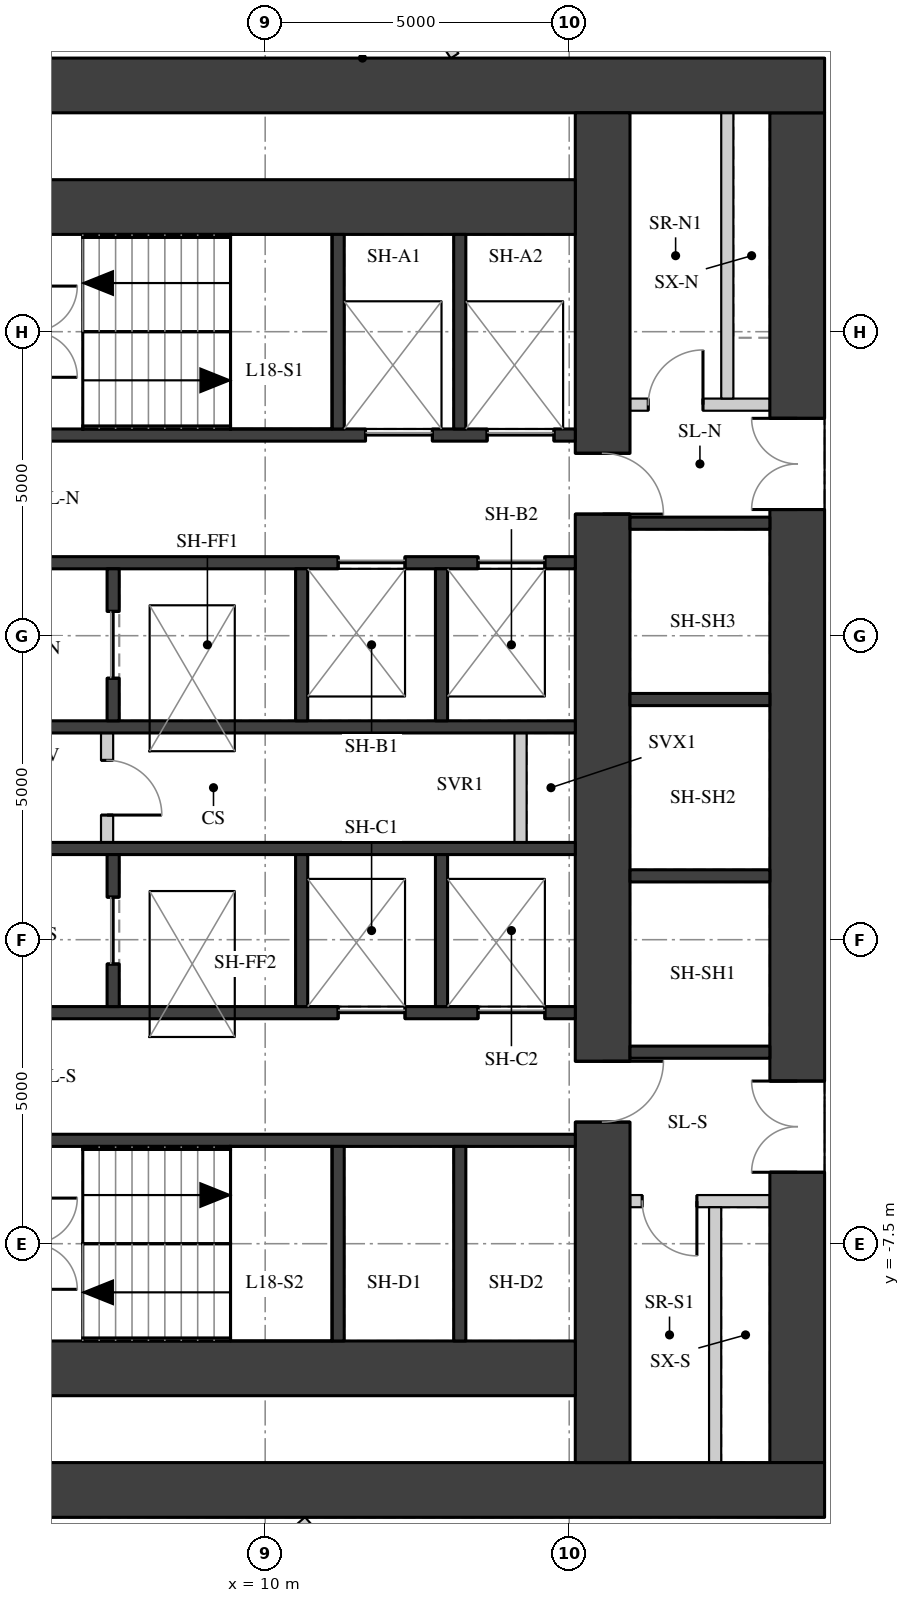
"""IFC4 building model, lengths in metres.
Left out: names, types, materials, properties, quantities, classifications, styles, units other than length and angle.
Written with IfcOpenShell. Run it as: python <this file> out.ifc"""

import sys

from ifc_helpers import new_model, si_unit, direction, frame, frame_2d, origin, place, context, subcontext, project, spatial, rectangle, extrude, element, fill, save


model = new_model("IFC4")
c1 = context("Model", 3, precision=1e-05, world=origin(), true_north=direction((0.0, 1.0)))
c2 = subcontext(c1, "Body", "Model", "MODEL_VIEW")
j1 = project(units=[si_unit("LENGTHUNIT", "METRE"), si_unit("PLANEANGLEUNIT", "RADIAN")], contexts=[c1])
p1 = place(None, origin())
s1 = spatial("IfcSite", under=j1, at=p1, CompositionType="ELEMENT")
p2 = place(p1, origin())
s2 = spatial("IfcBuilding", under=s1, at=p2, CompositionType="ELEMENT")
p3 = place(p2, frame((0.0, 0.0, 67.9)))
s3 = spatial("IfcBuildingStorey", under=s2, at=p3, CompositionType="ELEMENT", Elevation=67.9)
p4 = place(p3, frame((18.75, -11.1, 0.0), z_axis=(0.0, 0.0, 1.0), x_axis=(0.0, 1.0, 0.0)))
e1 = element("IfcWall", 1, at=p4, inside=s3, PredefinedType="SHEAR", context=c2, shape_type="SweptSolid", body=[
    extrude(rectangle(XDim=22.2, YDim=0.9, at=frame_2d((11.1, 0.0))), origin(), (0.0, 0.0, 1.0), 3.02),
])
p5 = place(p4, frame((15.675, 0.0, 0.0)))
e2 = element("IfcOpeningElement", 2, at=p5, cuts=e1, PredefinedType="OPENING", context=c2, shape_type="SweptSolid", body=[
    extrude(rectangle(XDim=1.5, YDim=2.1, at=frame_2d((0.75, 1.05))), frame((0.0, 0.46, 0.0), z_axis=(0.0, -1.0, 0.0), x_axis=(1.0, 0.0, 0.0)), (0.0, 0.0, 1.0), 0.92),
])
p6 = place(p4, frame((4.775, 0.0, 0.0)))
e3 = element("IfcOpeningElement", 3, at=p6, cuts=e1, PredefinedType="OPENING", context=c2, shape_type="SweptSolid", body=[
    extrude(rectangle(XDim=1.5, YDim=2.1, at=frame_2d((0.75, 1.05))), frame((0.0, 0.46, 0.0), z_axis=(0.0, -1.0, 0.0), x_axis=(1.0, 0.0, 0.0)), (0.0, 0.0, 1.0), 0.92),
])
for number, where, z_axis, x_axis in (
    (4, (4.0, 11.55, 0.0), (0.0, 0.0, 1.0), (1.0, 0.0, 0.0)),
    (5, (4.0, -11.55, 0.0), (0.0, 0.0, 1.0), (1.0, 0.0, 0.0)),
):
    element("IfcWall", number, at=place(p3, frame(where, z_axis=z_axis, x_axis=x_axis)), inside=s3, PredefinedType="SHEAR", context=c2, shape_type="SweptSolid", body=[
        extrude(rectangle(XDim=15.2, YDim=0.9, at=frame_2d((7.6, 0.0))), origin(), (0.0, 0.0, 1.0), 3.02),
    ])
p7 = place(p3, frame((15.55, -11.1, 0.0), z_axis=(0.0, 0.0, 1.0), x_axis=(0.0, 1.0, 0.0)))
e6 = element("IfcWall", 6, at=p7, inside=s3, PredefinedType="SHEAR", context=c2, shape_type="SweptSolid", body=[
    extrude(rectangle(XDim=22.2, YDim=0.9, at=frame_2d((11.1, 0.0))), origin(), (0.0, 0.0, 1.0), 3.02),
])
p8 = place(p7, frame((15.6, 0.0, 0.0)))
e7 = element("IfcOpeningElement", 7, at=p8, cuts=e6, PredefinedType="OPENING", context=c2, shape_type="SweptSolid", body=[
    extrude(rectangle(XDim=1.0, YDim=2.1, at=frame_2d((0.5, 1.05))), frame((0.0, 0.46, 0.0), z_axis=(0.0, -1.0, 0.0), x_axis=(1.0, 0.0, 0.0)), (0.0, 0.0, 1.0), 0.92),
])
p9 = place(p7, frame((5.6, 0.0, 0.0)))
e8 = element("IfcOpeningElement", 8, at=p9, cuts=e6, PredefinedType="OPENING", context=c2, shape_type="SweptSolid", body=[
    extrude(rectangle(XDim=1.0, YDim=2.1, at=frame_2d((0.5, 1.05))), frame((0.0, 0.46, 0.0), z_axis=(0.0, -1.0, 0.0), x_axis=(1.0, 0.0, 0.0)), (0.0, 0.0, 1.0), 0.92),
])
for number, where, z_axis, x_axis in (
    (9, (4.9, 9.55, 0.0), (0.0, 0.0, 1.0), (1.0, 0.0, 0.0)),
    (10, (4.9, -9.55, 0.0), (0.0, 0.0, 1.0), (1.0, 0.0, 0.0)),
):
    element("IfcWall", number, at=place(p3, frame(where, z_axis=z_axis, x_axis=x_axis)), inside=s3, PredefinedType="SHEAR", context=c2, shape_type="SweptSolid", body=[
        extrude(rectangle(XDim=10.2, YDim=0.9, at=frame_2d((5.1, 0.0))), origin(), (0.0, 0.0, 1.0), 3.02),
    ])
p10 = place(p3, frame((4.9, 5.8, 0.0), z_axis=(0.0, 0.0, 1.0), x_axis=(1.0, 0.0, 0.0)))
e11 = element("IfcWall", 11, at=p10, inside=s3, PredefinedType="SHEAR", context=c2, shape_type="SweptSolid", body=[
    extrude(rectangle(XDim=10.2, YDim=0.2, at=frame_2d((5.1, 0.0))), origin(), (0.0, 0.0, 1.0), 3.02),
])
p11 = place(p10, frame((6.75, 0.0, 0.0)))
e12 = element("IfcOpeningElement", 12, at=p11, cuts=e11, PredefinedType="OPENING", context=c2, shape_type="SweptSolid", body=[
    extrude(rectangle(XDim=1.1, YDim=2.1, at=frame_2d((0.55, 1.05))), frame((0.0, 0.11, 0.0), z_axis=(0.0, -1.0, 0.0), x_axis=(1.0, 0.0, 0.0)), (0.0, 0.0, 1.0), 0.22),
])
p12 = place(p10, frame((8.75, 0.0, 0.0)))
e13 = element("IfcOpeningElement", 13, at=p12, cuts=e11, PredefinedType="OPENING", context=c2, shape_type="SweptSolid", body=[
    extrude(rectangle(XDim=1.1, YDim=2.1, at=frame_2d((0.55, 1.05))), frame((0.0, 0.11, 0.0), z_axis=(0.0, -1.0, 0.0), x_axis=(1.0, 0.0, 0.0)), (0.0, 0.0, 1.0), 0.22),
])
p13 = place(p3, frame((4.9, 3.7, 0.0), z_axis=(0.0, 0.0, 1.0), x_axis=(1.0, 0.0, 0.0)))
e14 = element("IfcWall", 14, at=p13, inside=s3, PredefinedType="SHEAR", context=c2, shape_type="SweptSolid", body=[
    extrude(rectangle(XDim=10.2, YDim=0.2, at=frame_2d((5.1, 0.0))), origin(), (0.0, 0.0, 1.0), 3.02),
])
p14 = place(p13, frame((6.3, 0.0, 0.0)))
e15 = element("IfcOpeningElement", 15, at=p14, cuts=e14, PredefinedType="OPENING", context=c2, shape_type="SweptSolid", body=[
    extrude(rectangle(XDim=1.1, YDim=2.1, at=frame_2d((0.55, 1.05))), frame((0.0, 0.11, 0.0), z_axis=(0.0, -1.0, 0.0), x_axis=(1.0, 0.0, 0.0)), (0.0, 0.0, 1.0), 0.22),
])
p15 = place(p13, frame((8.6, 0.0, 0.0)))
e16 = element("IfcOpeningElement", 16, at=p15, cuts=e14, PredefinedType="OPENING", context=c2, shape_type="SweptSolid", body=[
    extrude(rectangle(XDim=1.1, YDim=2.1, at=frame_2d((0.55, 1.05))), frame((0.0, 0.11, 0.0), z_axis=(0.0, -1.0, 0.0), x_axis=(1.0, 0.0, 0.0)), (0.0, 0.0, 1.0), 0.22),
])
for number, where, z_axis, x_axis in (
    (17, (4.9, 1.0, 0.0), (0.0, 0.0, 1.0), (1.0, 0.0, 0.0)),
    (18, (4.9, -1.0, 0.0), (0.0, 0.0, 1.0), (1.0, 0.0, 0.0)),
):
    element("IfcWall", number, at=place(p3, frame(where, z_axis=z_axis, x_axis=x_axis)), inside=s3, PredefinedType="SHEAR", context=c2, shape_type="SweptSolid", body=[
        extrude(rectangle(XDim=10.2, YDim=0.2, at=frame_2d((5.1, 0.0))), origin(), (0.0, 0.0, 1.0), 3.02),
    ])
p16 = place(p3, frame((4.9, -3.7, 0.0), z_axis=(0.0, 0.0, 1.0), x_axis=(1.0, 0.0, 0.0)))
e19 = element("IfcWall", 19, at=p16, inside=s3, PredefinedType="SHEAR", context=c2, shape_type="SweptSolid", body=[
    extrude(rectangle(XDim=10.2, YDim=0.2, at=frame_2d((5.1, 0.0))), origin(), (0.0, 0.0, 1.0), 3.02),
])
p17 = place(p16, frame((6.3, 0.0, 0.0)))
e20 = element("IfcOpeningElement", 20, at=p17, cuts=e19, PredefinedType="OPENING", context=c2, shape_type="SweptSolid", body=[
    extrude(rectangle(XDim=1.1, YDim=2.1, at=frame_2d((0.55, 1.05))), frame((0.0, 0.11, 0.0), z_axis=(0.0, -1.0, 0.0), x_axis=(1.0, 0.0, 0.0)), (0.0, 0.0, 1.0), 0.22),
])
p18 = place(p16, frame((8.6, 0.0, 0.0)))
e21 = element("IfcOpeningElement", 21, at=p18, cuts=e19, PredefinedType="OPENING", context=c2, shape_type="SweptSolid", body=[
    extrude(rectangle(XDim=1.1, YDim=2.1, at=frame_2d((0.55, 1.05))), frame((0.0, 0.11, 0.0), z_axis=(0.0, -1.0, 0.0), x_axis=(1.0, 0.0, 0.0)), (0.0, 0.0, 1.0), 0.22),
])
p19 = place(p3, frame((4.9, -5.8, 0.0), z_axis=(0.0, 0.0, 1.0), x_axis=(1.0, 0.0, 0.0)))
e22 = element("IfcWall", 22, at=p19, inside=s3, PredefinedType="SHEAR", context=c2, shape_type="SweptSolid", body=[
    extrude(rectangle(XDim=10.2, YDim=0.2, at=frame_2d((5.1, 0.0))), origin(), (0.0, 0.0, 1.0), 3.02),
])
for number, where, z_axis, x_axis in (
    (23, (11.2, 5.9, 0.0), (0.0, 0.0, 1.0), (0.0, 1.0, 0.0)),
    (24, (11.2, -9.1, 0.0), (0.0, 0.0, 1.0), (0.0, 1.0, 0.0)),
    (25, (13.2, 5.9, 0.0), (0.0, 0.0, 1.0), (0.0, 1.0, 0.0)),
    (26, (13.2, -9.1, 0.0), (0.0, 0.0, 1.0), (0.0, 1.0, 0.0)),
):
    element("IfcWall", number, at=place(p3, frame(where, z_axis=z_axis, x_axis=x_axis)), inside=s3, PredefinedType="SHEAR", context=c2, shape_type="SweptSolid", body=[
        extrude(rectangle(XDim=3.2, YDim=0.2, at=frame_2d((1.6, 0.0))), origin(), (0.0, 0.0, 1.0), 3.02),
    ])
p20 = place(p3, frame((7.5, 1.1, 0.0), z_axis=(0.0, 0.0, 1.0), x_axis=(0.0, 1.0, 0.0)))
e27 = element("IfcWall", 27, at=p20, inside=s3, PredefinedType="SHEAR", context=c2, shape_type="SweptSolid", body=[
    extrude(rectangle(XDim=2.5, YDim=0.2, at=frame_2d((1.25, 0.0))), origin(), (0.0, 0.0, 1.0), 3.02),
])
p21 = place(p20, frame((0.7, 0.0, 0.0)))
e28 = element("IfcOpeningElement", 28, at=p21, cuts=e27, PredefinedType="OPENING", context=c2, shape_type="SweptSolid", body=[
    extrude(rectangle(XDim=1.1, YDim=2.1, at=frame_2d((0.55, 1.05))), frame((0.0, 0.11, 0.0), z_axis=(0.0, -1.0, 0.0), x_axis=(1.0, 0.0, 0.0)), (0.0, 0.0, 1.0), 0.22),
])
p22 = place(p3, frame((7.5, -3.6, 0.0), z_axis=(0.0, 0.0, 1.0), x_axis=(0.0, 1.0, 0.0)))
e29 = element("IfcWall", 29, at=p22, inside=s3, PredefinedType="SHEAR", context=c2, shape_type="SweptSolid", body=[
    extrude(rectangle(XDim=2.5, YDim=0.2, at=frame_2d((1.25, 0.0))), origin(), (0.0, 0.0, 1.0), 3.02),
])
p23 = place(p22, frame((0.7, 0.0, 0.0)))
e30 = element("IfcOpeningElement", 30, at=p23, cuts=e29, PredefinedType="OPENING", context=c2, shape_type="SweptSolid", body=[
    extrude(rectangle(XDim=1.1, YDim=2.1, at=frame_2d((0.55, 1.05))), frame((0.0, 0.11, 0.0), z_axis=(0.0, -1.0, 0.0), x_axis=(1.0, 0.0, 0.0)), (0.0, 0.0, 1.0), 0.22),
])
for number, where, z_axis, x_axis in (
    (31, (10.6, 1.1, 0.0), (0.0, 0.0, 1.0), (0.0, 1.0, 0.0)),
    (32, (10.6, -3.6, 0.0), (0.0, 0.0, 1.0), (0.0, 1.0, 0.0)),
    (33, (12.9, 1.1, 0.0), (0.0, 0.0, 1.0), (0.0, 1.0, 0.0)),
    (34, (12.9, -3.6, 0.0), (0.0, 0.0, 1.0), (0.0, 1.0, 0.0)),
):
    element("IfcWall", number, at=place(p3, frame(where, z_axis=z_axis, x_axis=x_axis)), inside=s3, PredefinedType="SHEAR", context=c2, shape_type="SweptSolid", body=[
        extrude(rectangle(XDim=2.5, YDim=0.2, at=frame_2d((1.25, 0.0))), origin(), (0.0, 0.0, 1.0), 3.02),
    ])
p24 = place(p3, frame((7.4, -0.9, 0.0), z_axis=(0.0, 0.0, 1.0), x_axis=(0.0, 1.0, 0.0)))
e35 = element("IfcWall", 35, at=p24, inside=s3, PredefinedType="PARTITIONING", context=c2, shape_type="SweptSolid", body=[
    extrude(rectangle(XDim=1.8, YDim=0.2, at=frame_2d((0.9, 0.0))), origin(), (0.0, 0.0, 1.0), 3.02),
])
p25 = place(p24, frame((0.45, 0.0, 0.0)))
e36 = element("IfcOpeningElement", 36, at=p25, cuts=e35, PredefinedType="OPENING", context=c2, shape_type="SweptSolid", body=[
    extrude(rectangle(XDim=0.9, YDim=2.1, at=frame_2d((0.45, 1.05))), frame((0.0, 0.11, 0.0), z_axis=(0.0, -1.0, 0.0), x_axis=(1.0, 0.0, 0.0)), (0.0, 0.0, 1.0), 0.22),
])
p26 = place(p3, frame((14.2, -0.9, 0.0), z_axis=(0.0, 0.0, 1.0), x_axis=(0.0, 1.0, 0.0)))
e37 = element("IfcWall", 37, at=p26, inside=s3, PredefinedType="PARTITIONING", context=c2, shape_type="SweptSolid", body=[
    extrude(rectangle(XDim=1.8, YDim=0.2, at=frame_2d((0.9, 0.0))), origin(), (0.0, 0.0, 1.0), 3.02),
])
for number, where, z_axis, x_axis in (
    (38, (16.0, -4.35, 0.0), (0.0, 0.0, 1.0), (1.0, 0.0, 0.0)),
    (39, (16.0, -1.45, 0.0), (0.0, 0.0, 1.0), (1.0, 0.0, 0.0)),
    (40, (16.0, 1.45, 0.0), (0.0, 0.0, 1.0), (1.0, 0.0, 0.0)),
    (41, (16.0, 4.35, 0.0), (0.0, 0.0, 1.0), (1.0, 0.0, 0.0)),
):
    element("IfcWall", number, at=place(p3, frame(where, z_axis=z_axis, x_axis=x_axis)), inside=s3, PredefinedType="SHEAR", context=c2, shape_type="SweptSolid", body=[
        extrude(rectangle(XDim=2.3, YDim=0.2, at=frame_2d((1.15, 0.0))), origin(), (0.0, 0.0, 1.0), 3.02),
    ])
p27 = place(p3, frame((16.0, 6.3, 0.0), z_axis=(0.0, 0.0, 1.0), x_axis=(1.0, 0.0, 0.0)))
e42 = element("IfcWall", 42, at=p27, inside=s3, PredefinedType="PARTITIONING", context=c2, shape_type="SweptSolid", body=[
    extrude(rectangle(XDim=2.3, YDim=0.2, at=frame_2d((1.15, 0.0))), origin(), (0.0, 0.0, 1.0), 3.02),
])
p28 = place(p27, frame((0.3, 0.0, 0.0)))
e43 = element("IfcOpeningElement", 43, at=p28, cuts=e42, PredefinedType="OPENING", context=c2, shape_type="SweptSolid", body=[
    extrude(rectangle(XDim=0.9, YDim=2.1, at=frame_2d((0.45, 1.05))), frame((0.0, 0.11, 0.0), z_axis=(0.0, -1.0, 0.0), x_axis=(1.0, 0.0, 0.0)), (0.0, 0.0, 1.0), 0.22),
])
p29 = place(p3, frame((17.6, 6.4, 0.0), z_axis=(0.0, 0.0, 1.0), x_axis=(0.0, 1.0, 0.0)))
e44 = element("IfcWall", 44, at=p29, inside=s3, PredefinedType="PARTITIONING", context=c2, shape_type="SweptSolid", body=[
    extrude(rectangle(XDim=4.7, YDim=0.2, at=frame_2d((2.35, 0.0))), origin(), (0.0, 0.0, 1.0), 3.02),
])
p30 = place(p3, frame((16.0, -6.8, 0.0), z_axis=(0.0, 0.0, 1.0), x_axis=(1.0, 0.0, 0.0)))
e45 = element("IfcWall", 45, at=p30, inside=s3, PredefinedType="PARTITIONING", context=c2, shape_type="SweptSolid", body=[
    extrude(rectangle(XDim=2.3, YDim=0.2, at=frame_2d((1.15, 0.0))), origin(), (0.0, 0.0, 1.0), 3.02),
])
p31 = place(p30, frame((0.2, 0.0, 0.0)))
e46 = element("IfcOpeningElement", 46, at=p31, cuts=e45, PredefinedType="OPENING", context=c2, shape_type="SweptSolid", body=[
    extrude(rectangle(XDim=0.9, YDim=2.1, at=frame_2d((0.45, 1.05))), frame((0.0, 0.11, 0.0), z_axis=(0.0, -1.0, 0.0), x_axis=(1.0, 0.0, 0.0)), (0.0, 0.0, 1.0), 0.22),
])
p32 = place(p3, frame((17.4, -11.1, 0.0), z_axis=(0.0, 0.0, 1.0), x_axis=(0.0, 1.0, 0.0)))
e47 = element("IfcWall", 47, at=p32, inside=s3, PredefinedType="PARTITIONING", context=c2, shape_type="SweptSolid", body=[
    extrude(rectangle(XDim=4.2, YDim=0.2, at=frame_2d((2.1, 0.0))), origin(), (0.0, 0.0, 1.0), 3.02),
])
p33 = place(p3, frame((12.864, 12.423, 0.0), z_axis=(0.0, 0.0, 1.0), x_axis=(0.545733799108, -0.837958603101, 0.0)))
e48 = element("IfcWall", 48, at=p33, inside=s3, PredefinedType="PARTITIONING", context=c2, shape_type="SweptSolid", body=[
    extrude(rectangle(XDim=0.46, YDim=0.15, at=frame_2d((0.23, 0.0))), origin(), (0.0, 0.0, 1.0), 3.02),
])
p34 = place(p3, frame((10.704, -12.052, 0.0), z_axis=(0.0, 0.0, 1.0), x_axis=(-0.749630421232, -0.661856654846, 0.0)))
e49 = element("IfcWall", 49, at=p34, inside=s3, PredefinedType="PARTITIONING", context=c2, shape_type="SweptSolid", body=[
    extrude(rectangle(XDim=5.29, YDim=0.15, at=frame_2d((2.645, 0.0))), origin(), (0.0, 0.0, 1.0), 3.02),
])
p35 = place(p5, origin())
e50 = element("IfcDoor", 50, at=p35, inside=s3, OperationType="DOUBLE_DOOR_SINGLE_SWING", PredefinedType="DOOR", context=c2, shape_type="SweptSolid", body=[
    extrude(rectangle(XDim=1.5, YDim=2.1, at=frame_2d((0.75, 1.05))), frame((0.0, 0.025, 0.0), z_axis=(0.0, -1.0, 0.0), x_axis=(1.0, 0.0, 0.0)), (0.0, 0.0, 1.0), 0.05),
])
fill(e2, e50)
p36 = place(p6, origin())
e51 = element("IfcDoor", 51, at=p36, inside=s3, OperationType="DOUBLE_DOOR_SINGLE_SWING", PredefinedType="DOOR", context=c2, shape_type="SweptSolid", body=[
    extrude(rectangle(XDim=1.5, YDim=2.1, at=frame_2d((0.75, 1.05))), frame((0.0, 0.025, 0.0), z_axis=(0.0, -1.0, 0.0), x_axis=(1.0, 0.0, 0.0)), (0.0, 0.0, 1.0), 0.05),
])
fill(e3, e51)
p37 = place(p11, origin())
e52 = element("IfcDoor", 52, at=p37, inside=s3, OperationType="DOUBLE_DOOR_SLIDING", PredefinedType="DOOR", context=c2, shape_type="SweptSolid", body=[
    extrude(rectangle(XDim=1.1, YDim=2.1, at=frame_2d((0.55, 1.05))), frame((0.0, 0.025, 0.0), z_axis=(0.0, -1.0, 0.0), x_axis=(1.0, 0.0, 0.0)), (0.0, 0.0, 1.0), 0.05),
])
fill(e12, e52)
p38 = place(p12, origin())
e53 = element("IfcDoor", 53, at=p38, inside=s3, OperationType="DOUBLE_DOOR_SLIDING", PredefinedType="DOOR", context=c2, shape_type="SweptSolid", body=[
    extrude(rectangle(XDim=1.1, YDim=2.1, at=frame_2d((0.55, 1.05))), frame((0.0, 0.025, 0.0), z_axis=(0.0, -1.0, 0.0), x_axis=(1.0, 0.0, 0.0)), (0.0, 0.0, 1.0), 0.05),
])
fill(e13, e53)
p39 = place(p14, origin())
e54 = element("IfcDoor", 54, at=p39, inside=s3, OperationType="DOUBLE_DOOR_SLIDING", PredefinedType="DOOR", context=c2, shape_type="SweptSolid", body=[
    extrude(rectangle(XDim=1.1, YDim=2.1, at=frame_2d((0.55, 1.05))), frame((0.0, 0.025, 0.0), z_axis=(0.0, -1.0, 0.0), x_axis=(1.0, 0.0, 0.0)), (0.0, 0.0, 1.0), 0.05),
])
fill(e15, e54)
p40 = place(p15, origin())
e55 = element("IfcDoor", 55, at=p40, inside=s3, OperationType="DOUBLE_DOOR_SLIDING", PredefinedType="DOOR", context=c2, shape_type="SweptSolid", body=[
    extrude(rectangle(XDim=1.1, YDim=2.1, at=frame_2d((0.55, 1.05))), frame((0.0, 0.025, 0.0), z_axis=(0.0, -1.0, 0.0), x_axis=(1.0, 0.0, 0.0)), (0.0, 0.0, 1.0), 0.05),
])
fill(e16, e55)
p41 = place(p17, origin())
e56 = element("IfcDoor", 56, at=p41, inside=s3, OperationType="DOUBLE_DOOR_SLIDING", PredefinedType="DOOR", context=c2, shape_type="SweptSolid", body=[
    extrude(rectangle(XDim=1.1, YDim=2.1, at=frame_2d((0.55, 1.05))), frame((0.0, 0.025, 0.0), z_axis=(0.0, -1.0, 0.0), x_axis=(1.0, 0.0, 0.0)), (0.0, 0.0, 1.0), 0.05),
])
fill(e20, e56)
p42 = place(p18, origin())
e57 = element("IfcDoor", 57, at=p42, inside=s3, OperationType="DOUBLE_DOOR_SLIDING", PredefinedType="DOOR", context=c2, shape_type="SweptSolid", body=[
    extrude(rectangle(XDim=1.1, YDim=2.1, at=frame_2d((0.55, 1.05))), frame((0.0, 0.025, 0.0), z_axis=(0.0, -1.0, 0.0), x_axis=(1.0, 0.0, 0.0)), (0.0, 0.0, 1.0), 0.05),
])
fill(e21, e57)
p43 = place(p21, origin())
e58 = element("IfcDoor", 58, at=p43, inside=s3, OperationType="DOUBLE_DOOR_SLIDING", PredefinedType="DOOR", context=c2, shape_type="SweptSolid", body=[
    extrude(rectangle(XDim=1.1, YDim=2.1, at=frame_2d((0.55, 1.05))), frame((0.0, 0.025, 0.0), z_axis=(0.0, -1.0, 0.0), x_axis=(1.0, 0.0, 0.0)), (0.0, 0.0, 1.0), 0.05),
])
fill(e28, e58)
p44 = place(p23, origin())
e59 = element("IfcDoor", 59, at=p44, inside=s3, OperationType="DOUBLE_DOOR_SLIDING", PredefinedType="DOOR", context=c2, shape_type="SweptSolid", body=[
    extrude(rectangle(XDim=1.1, YDim=2.1, at=frame_2d((0.55, 1.05))), frame((0.0, 0.025, 0.0), z_axis=(0.0, -1.0, 0.0), x_axis=(1.0, 0.0, 0.0)), (0.0, 0.0, 1.0), 0.05),
])
fill(e30, e59)
p45 = place(p25, origin())
e60 = element("IfcDoor", 60, at=p45, inside=s3, OperationType="SINGLE_SWING_RIGHT", PredefinedType="DOOR", context=c2, shape_type="SweptSolid", body=[
    extrude(rectangle(XDim=0.9, YDim=2.1, at=frame_2d((0.45, 1.05))), frame((0.0, 0.025, 0.0), z_axis=(0.0, -1.0, 0.0), x_axis=(1.0, 0.0, 0.0)), (0.0, 0.0, 1.0), 0.05),
])
fill(e36, e60)
p46 = place(p8, origin())
e61 = element("IfcDoor", 61, at=p46, inside=s3, OperationType="SINGLE_SWING_RIGHT", PredefinedType="DOOR", context=c2, shape_type="SweptSolid", body=[
    extrude(rectangle(XDim=1.0, YDim=2.1, at=frame_2d((0.5, 1.05))), frame((0.0, 0.025, 0.0), z_axis=(0.0, -1.0, 0.0), x_axis=(1.0, 0.0, 0.0)), (0.0, 0.0, 1.0), 0.05),
])
fill(e7, e61)
p47 = place(p28, origin())
e62 = element("IfcDoor", 62, at=p47, inside=s3, OperationType="SINGLE_SWING_RIGHT", PredefinedType="DOOR", context=c2, shape_type="SweptSolid", body=[
    extrude(rectangle(XDim=0.9, YDim=2.1, at=frame_2d((0.45, 1.05))), frame((0.0, 0.025, 0.0), z_axis=(0.0, -1.0, 0.0), x_axis=(1.0, 0.0, 0.0)), (0.0, 0.0, 1.0), 0.05),
])
fill(e43, e62)
p48 = place(p9, origin())
e63 = element("IfcDoor", 63, at=p48, inside=s3, OperationType="SINGLE_SWING_LEFT", PredefinedType="DOOR", context=c2, shape_type="SweptSolid", body=[
    extrude(rectangle(XDim=1.0, YDim=2.1, at=frame_2d((0.5, 1.05))), frame((0.0, 0.025, 0.0), z_axis=(0.0, -1.0, 0.0), x_axis=(1.0, 0.0, 0.0)), (0.0, 0.0, 1.0), 0.05),
])
fill(e8, e63)
p49 = place(p31, origin())
e64 = element("IfcDoor", 64, at=p49, inside=s3, OperationType="SINGLE_SWING_LEFT", PredefinedType="DOOR", context=c2, shape_type="SweptSolid", body=[
    extrude(rectangle(XDim=0.9, YDim=2.1, at=frame_2d((0.45, 1.05))), frame((0.0, 0.025, 0.0), z_axis=(0.0, -1.0, 0.0), x_axis=(1.0, 0.0, 0.0)), (0.0, 0.0, 1.0), 0.05),
])
fill(e46, e64)
save(model, sys.argv[1])
